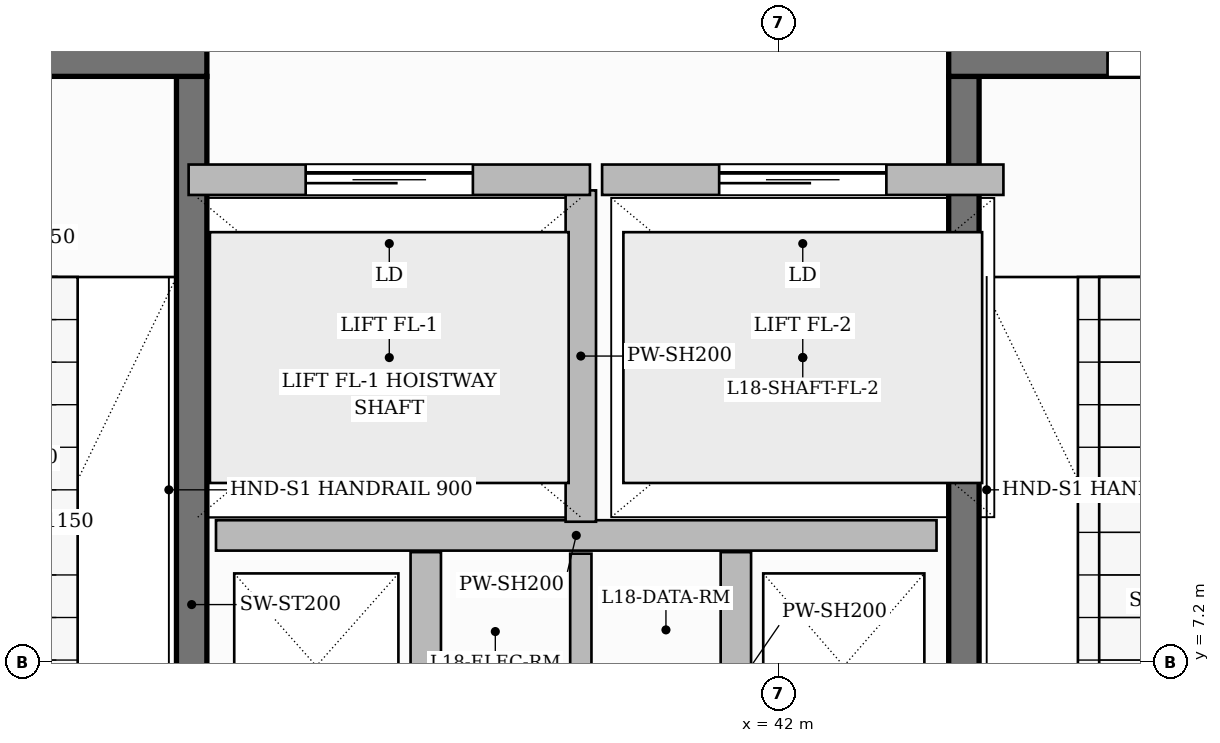
"""IFC4 building model, lengths in metres.
Left out: names, types, materials, properties, quantities, classifications, styles, units other than length and angle.
Written with IfcOpenShell. Run it as: python <this file> out.ifc"""

import sys

from ifc_helpers import new_model, si_unit, direction, frame, frame_2d, origin, place, context, subcontext, project, spatial, rectangle, extrude, source, transform, mapped, element, fill, save


model = new_model("IFC4")
c1 = context("Model", 3, precision=1e-05, world=origin(), true_north=direction((0.0, 1.0)))
c2 = subcontext(c1, "Body", "Model", "MODEL_VIEW")
j1 = project(units=[si_unit("LENGTHUNIT", "METRE"), si_unit("PLANEANGLEUNIT", "RADIAN")], contexts=[c1])
p1 = place(None, origin())
s1 = spatial("IfcSite", under=j1, at=p1, CompositionType="ELEMENT")
p2 = place(p1, origin())
s2 = spatial("IfcBuilding", under=s1, at=p2, CompositionType="ELEMENT")
p3 = place(p2, frame((0.0, 0.0, 32.4)))
s3 = spatial("IfcBuildingStorey", under=s2, at=p3, CompositionType="ELEMENT", Elevation=32.4)
p4 = place(p3, frame((38.14, 4.1, 0.0), z_axis=(0.0, 0.0, 1.0), x_axis=(0.0, 1.0, 0.0)))
e1 = element("IfcWall", 1, at=p4, inside=s3, PredefinedType="SHEAR", context=c2, shape_type="SweptSolid", body=[
    extrude(rectangle(XDim=6.95, YDim=0.2, at=frame_2d((3.475, 0.0))), origin(), (0.0, 0.0, 1.0), 3.7),
])
p5 = place(p3, frame((35.1, 11.15, 0.0), z_axis=(0.0, 0.0, 1.0), x_axis=(1.0, 0.0, 0.0)))
e2 = element("IfcWall", 2, at=p5, inside=s3, PredefinedType="SHEAR", context=c2, shape_type="SweptSolid", body=[
    extrude(rectangle(XDim=3.14, YDim=0.2, at=frame_2d((1.57, 0.0))), origin(), (0.0, 0.0, 1.0), 3.7),
])
p6 = place(p5, frame((1.045, 0.0, 0.0)))
e3 = element("IfcOpeningElement", 3, at=p6, cuts=e2, PredefinedType="OPENING", context=c2, shape_type="SweptSolid", body=[
    extrude(rectangle(XDim=1.05, YDim=2.2, at=frame_2d((0.525, 1.1))), frame((0.0, 0.11, 0.0), z_axis=(0.0, -1.0, 0.0), x_axis=(1.0, 0.0, 0.0)), (0.0, 0.0, 1.0), 0.22),
])
p7 = place(p3, frame((43.22, 4.1, 0.0), z_axis=(0.0, 0.0, 1.0), x_axis=(0.0, 1.0, 0.0)))
e4 = element("IfcWall", 4, at=p7, inside=s3, PredefinedType="SHEAR", context=c2, shape_type="SweptSolid", body=[
    extrude(rectangle(XDim=6.95, YDim=0.2, at=frame_2d((3.475, 0.0))), origin(), (0.0, 0.0, 1.0), 3.7),
])
p8 = place(p3, frame((43.12, 11.15, 0.0), z_axis=(0.0, 0.0, 1.0), x_axis=(1.0, 0.0, 0.0)))
e5 = element("IfcWall", 5, at=p8, inside=s3, PredefinedType="SHEAR", context=c2, shape_type="SweptSolid", body=[
    extrude(rectangle(XDim=6.38, YDim=0.2, at=frame_2d((3.19, 0.0))), origin(), (0.0, 0.0, 1.0), 3.7),
])
p9 = place(p8, frame((1.045, 0.0, 0.0)))
e6 = element("IfcOpeningElement", 6, at=p9, cuts=e5, PredefinedType="OPENING", context=c2, shape_type="SweptSolid", body=[
    extrude(rectangle(XDim=1.05, YDim=2.2, at=frame_2d((0.525, 1.1))), frame((0.0, 0.11, 0.0), z_axis=(0.0, -1.0, 0.0), x_axis=(1.0, 0.0, 0.0)), (0.0, 0.0, 1.0), 0.22),
])
p10 = place(p8, frame((4.125, 0.0, 0.0)))
e7 = element("IfcOpeningElement", 7, at=p10, cuts=e5, PredefinedType="OPENING", context=c2, shape_type="SweptSolid", body=[
    extrude(rectangle(XDim=1.05, YDim=2.2, at=frame_2d((0.525, 1.1))), frame((0.0, 0.11, 0.0), z_axis=(0.0, -1.0, 0.0), x_axis=(1.0, 0.0, 0.0)), (0.0, 0.0, 1.0), 0.22),
])
p11 = place(p3, frame((38.3, 8.03, 0.0), z_axis=(0.0, 0.0, 1.0), x_axis=(1.0, 0.0, 0.0)))
e8 = element("IfcWall", 8, at=p11, inside=s3, PredefinedType="PARTITIONING", context=c2, shape_type="SweptSolid", body=[
    extrude(rectangle(XDim=4.74, YDim=0.2, at=frame_2d((2.37, 0.0))), origin(), (0.0, 0.0, 1.0), 3.45),
])
p12 = place(p3, frame((40.7, 8.12, 0.0), z_axis=(0.0, 0.0, 1.0), x_axis=(0.0, 1.0, 0.0)))
e9 = element("IfcWall", 9, at=p12, inside=s3, PredefinedType="PARTITIONING", context=c2, shape_type="SweptSolid", body=[
    extrude(rectangle(XDim=2.18, YDim=0.2, at=frame_2d((1.09, 0.0))), origin(), (0.0, 0.0, 1.0), 3.45),
])
for number, where, z_axis, x_axis in (
    (10, (39.68, 6.13, 0.0), (0.0, 0.0, 1.0), (0.0, 1.0, 0.0)),
    (11, (41.72, 6.13, 0.0), (0.0, 0.0, 1.0), (0.0, 1.0, 0.0)),
):
    element("IfcWall", number, at=place(p3, frame(where, z_axis=z_axis, x_axis=x_axis)), inside=s3, PredefinedType="PARTITIONING", context=c2, shape_type="SweptSolid", body=[
        extrude(rectangle(XDim=1.79, YDim=0.2, at=frame_2d((0.895, 0.0))), origin(), (0.0, 0.0, 1.0), 3.45),
    ])
p13 = place(p3, frame((40.7, 3.92, 0.0), z_axis=(0.0, 0.0, 1.0), x_axis=(0.0, 1.0, 0.0)))
e12 = element("IfcWall", 12, at=p13, inside=s3, PredefinedType="PARTITIONING", context=c2, shape_type="SweptSolid", body=[
    extrude(rectangle(XDim=3.99, YDim=0.14, at=frame_2d((1.995, 0.0))), origin(), (0.0, 0.0, 1.0), 3.45),
])
p14 = place(p3, frame((38.12, 10.37, 0.0), z_axis=(0.0, 0.0, 1.0), x_axis=(1.0, 0.0, 0.0)))
e13 = element("IfcWall", 13, at=p14, inside=s3, PredefinedType="PARTITIONING", context=c2, shape_type="SweptSolid", body=[
    extrude(rectangle(XDim=2.64, YDim=0.2, at=frame_2d((1.32, 0.0))), origin(), (0.0, 0.0, 1.0), 3.45),
])
p15 = place(p14, frame((0.77, 0.0, 0.0)))
e14 = element("IfcOpeningElement", 14, at=p15, cuts=e13, PredefinedType="OPENING", context=c2, shape_type="SweptSolid", body=[
    extrude(rectangle(XDim=1.1, YDim=2.2, at=frame_2d((0.55, 1.1))), frame((0.0, 0.11, 0.0), z_axis=(0.0, -1.0, 0.0), x_axis=(1.0, 0.0, 0.0)), (0.0, 0.0, 1.0), 0.22),
])
p16 = place(p3, frame((40.84, 10.37, 0.0), z_axis=(0.0, 0.0, 1.0), x_axis=(1.0, 0.0, 0.0)))
e15 = element("IfcWall", 15, at=p16, inside=s3, PredefinedType="PARTITIONING", context=c2, shape_type="SweptSolid", body=[
    extrude(rectangle(XDim=2.64, YDim=0.2, at=frame_2d((1.32, 0.0))), origin(), (0.0, 0.0, 1.0), 3.45),
])
p17 = place(p16, frame((0.77, 0.0, 0.0)))
e16 = element("IfcOpeningElement", 16, at=p17, cuts=e15, PredefinedType="OPENING", context=c2, shape_type="SweptSolid", body=[
    extrude(rectangle(XDim=1.1, YDim=2.2, at=frame_2d((0.55, 1.1))), frame((0.0, 0.11, 0.0), z_axis=(0.0, -1.0, 0.0), x_axis=(1.0, 0.0, 0.0)), (0.0, 0.0, 1.0), 0.22),
])
m1 = source(origin(), c2, "Body", "SweptSolid", [
    extrude(rectangle(XDim=1.05, YDim=2.2, at=frame_2d((0.525, 1.1))), frame((0.0, 0.025, 0.0), z_axis=(0.0, -1.0, 0.0), x_axis=(1.0, 0.0, 0.0)), (0.0, 0.0, 1.0), 0.05),
])
p18 = place(p9, origin())
e17 = element("IfcDoor", 17, at=p18, inside=s3, OperationType="SINGLE_SWING_LEFT", PredefinedType="DOOR", context=c2, shape_type="MappedRepresentation", body=[
    mapped(m1, transform((0.0, 0.0, 0.0), scale=1.0)),
])
fill(e6, e17)
m2 = source(origin(), c2, "Body", "SweptSolid", [
    extrude(rectangle(XDim=1.1, YDim=2.2, at=frame_2d((0.55, 1.1))), frame((0.0, 0.025, 0.0), z_axis=(0.0, -1.0, 0.0), x_axis=(1.0, 0.0, 0.0)), (0.0, 0.0, 1.0), 0.05),
])
p19 = place(p15, origin())
e18 = element("IfcDoor", 18, at=p19, inside=s3, OperationType="SLIDING_TO_LEFT", PredefinedType="DOOR", context=c2, shape_type="MappedRepresentation", body=[
    mapped(m2, transform((0.0, 0.0, 0.0), scale=1.0)),
])
fill(e14, e18)
p20 = place(p17, origin())
e19 = element("IfcDoor", 19, at=p20, inside=s3, OperationType="SLIDING_TO_LEFT", PredefinedType="DOOR", context=c2, shape_type="MappedRepresentation", body=[
    mapped(m2, transform((0.0, 0.0, 0.0), scale=1.0)),
])
fill(e16, e19)
save(model, sys.argv[1])
